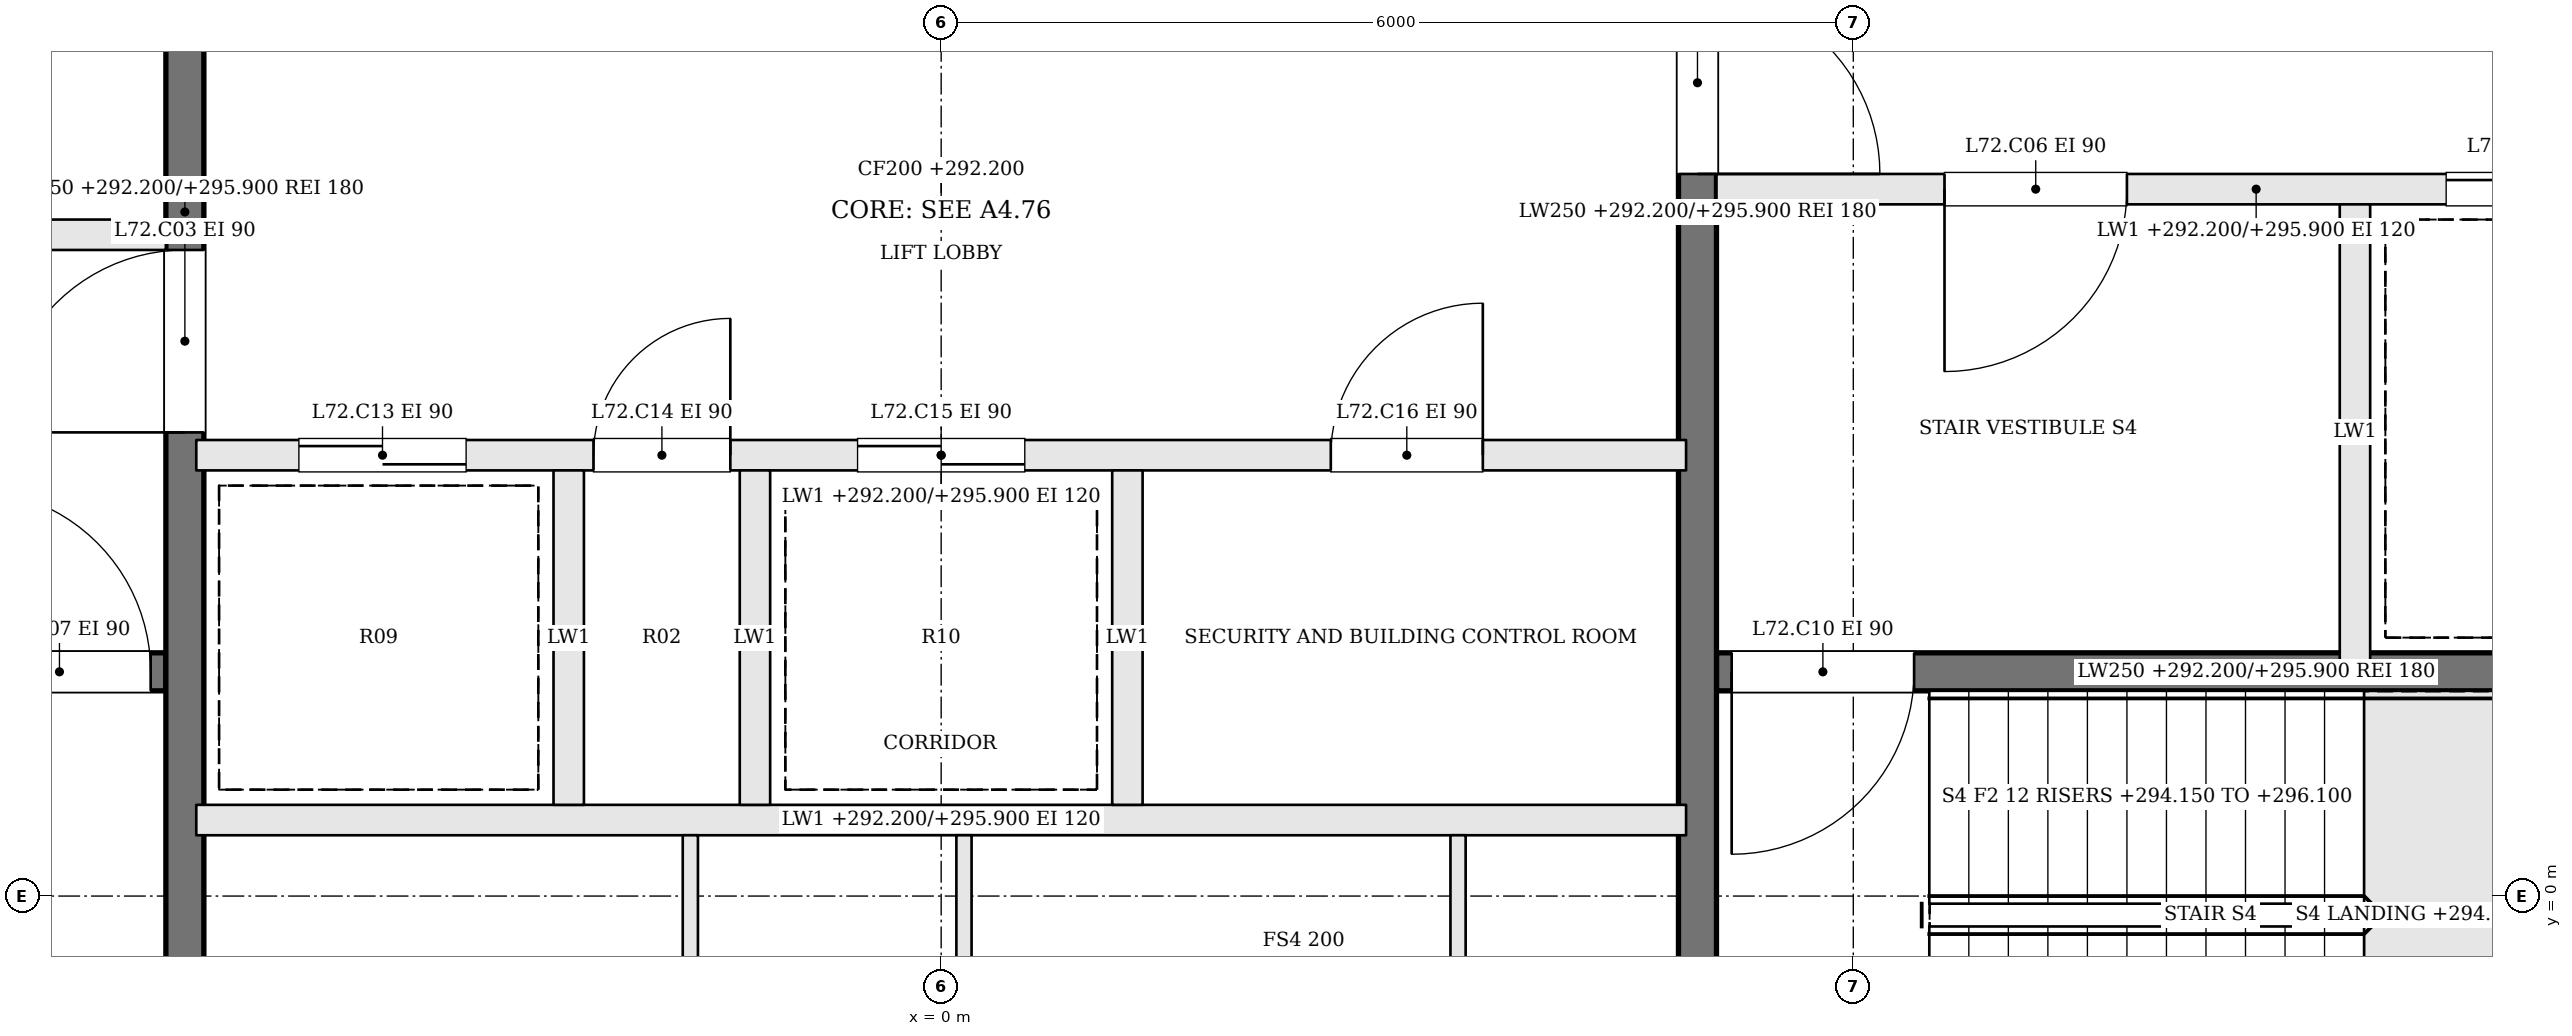
"""IFC4 building model, lengths in metres.
Left out: names, types, materials, properties, quantities, classifications, styles, units other than length and angle.
Written with IfcOpenShell. Run it as: python <this file> out.ifc"""

import sys

from ifc_helpers import new_model, si_unit, direction, frame, frame_2d, origin, place, context, subcontext, project, spatial, rectangle, extrude, element, fill, save


model = new_model("IFC4")
c1 = context("Model", 3, precision=1e-05, world=origin(), true_north=direction((0.0, 1.0)))
c2 = subcontext(c1, "Body", "Model", "MODEL_VIEW")
j1 = project(units=[si_unit("LENGTHUNIT", "METRE"), si_unit("PLANEANGLEUNIT", "RADIAN")], contexts=[c1])
p1 = place(None, origin())
s1 = spatial("IfcSite", under=j1, at=p1, CompositionType="ELEMENT")
p2 = place(p1, origin())
s2 = spatial("IfcBuilding", under=s1, at=p2, CompositionType="ELEMENT")
p3 = place(p2, frame((0.0, 0.0, 292.2)))
s3 = spatial("IfcBuildingStorey", under=s2, at=p3, CompositionType="ELEMENT", Elevation=292.2)
p4 = place(p3, frame((-12.2, 1.475, 0.0), z_axis=(0.0, 0.0, 1.0), x_axis=(1.0, 0.0, 0.0)))
e1 = element("IfcWall", 1, at=p4, inside=s3, PredefinedType="SOLIDWALL", context=c2, shape_type="SweptSolid", body=[
    extrude(rectangle(XDim=7.1, YDim=0.25, at=frame_2d((3.55, 0.0))), origin(), (0.0, 0.0, 1.0), 3.7),
])
p5 = place(p4, frame((5.8, 0.0, 0.0)))
e2 = element("IfcOpeningElement", 2, at=p5, cuts=e1, PredefinedType="OPENING", context=c2, shape_type="SweptSolid", body=[
    extrude(rectangle(XDim=1.2, YDim=2.1, at=frame_2d((0.6, 1.05))), frame((0.0, 0.135, 0.0), z_axis=(0.0, -1.0, 0.0), x_axis=(1.0, 0.0, 0.0)), (0.0, 0.0, 1.0), 0.27),
])
p6 = place(p3, frame((-12.2, 4.35, 0.0), z_axis=(0.0, 0.0, 1.0), x_axis=(1.0, 0.0, 0.0)))
e3 = element("IfcWall", 3, at=p6, inside=s3, PredefinedType="SOLIDWALL", context=c2, shape_type="SweptSolid", body=[
    extrude(rectangle(XDim=7.1, YDim=0.2, at=frame_2d((3.55, 0.0))), origin(), (0.0, 0.0, 1.0), 3.7),
])
p7 = place(p6, frame((4.4, 0.0, 0.0)))
e4 = element("IfcOpeningElement", 4, at=p7, cuts=e3, PredefinedType="OPENING", context=c2, shape_type="SweptSolid", body=[
    extrude(rectangle(XDim=1.2, YDim=2.1, at=frame_2d((0.6, 1.05))), frame((0.0, 0.11, 0.0), z_axis=(0.0, -1.0, 0.0), x_axis=(1.0, 0.0, 0.0)), (0.0, 0.0, 1.0), 0.22),
])
p8 = place(p6, frame((1.1, 0.0, 0.0)))
e5 = element("IfcOpeningElement", 5, at=p8, cuts=e3, PredefinedType="OPENING", context=c2, shape_type="SweptSolid", body=[
    extrude(rectangle(XDim=1.2, YDim=2.1, at=frame_2d((0.6, 1.05))), frame((0.0, 0.11, 0.0), z_axis=(0.0, -1.0, 0.0), x_axis=(1.0, 0.0, 0.0)), (0.0, 0.0, 1.0), 0.22),
])
p9 = place(p3, frame((12.2, 4.65, 0.0), z_axis=(0.0, 0.0, 1.0), x_axis=(-1.0, 0.0, 0.0)))
e6 = element("IfcWall", 6, at=p9, inside=s3, PredefinedType="SOLIDWALL", context=c2, shape_type="SweptSolid", body=[
    extrude(rectangle(XDim=7.1, YDim=0.2, at=frame_2d((3.55, 0.0))), origin(), (0.0, 0.0, 1.0), 3.7),
])
p10 = place(p9, frame((4.4, 0.0, 0.0)))
e7 = element("IfcOpeningElement", 7, at=p10, cuts=e6, PredefinedType="OPENING", context=c2, shape_type="SweptSolid", body=[
    extrude(rectangle(XDim=1.2, YDim=2.1, at=frame_2d((0.6, 1.05))), frame((0.0, 0.11, 0.0), z_axis=(0.0, -1.0, 0.0), x_axis=(1.0, 0.0, 0.0)), (0.0, 0.0, 1.0), 0.22),
])
p11 = place(p9, frame((1.1, 0.0, 0.0)))
e8 = element("IfcOpeningElement", 8, at=p11, cuts=e6, PredefinedType="OPENING", context=c2, shape_type="SweptSolid", body=[
    extrude(rectangle(XDim=1.2, YDim=2.1, at=frame_2d((0.6, 1.05))), frame((0.0, 0.11, 0.0), z_axis=(0.0, -1.0, 0.0), x_axis=(1.0, 0.0, 0.0)), (0.0, 0.0, 1.0), 0.22),
])
p12 = place(p3, frame((12.2, 1.475, 0.0), z_axis=(0.0, 0.0, 1.0), x_axis=(-1.0, 0.0, 0.0)))
e9 = element("IfcWall", 9, at=p12, inside=s3, PredefinedType="SOLIDWALL", context=c2, shape_type="SweptSolid", body=[
    extrude(rectangle(XDim=7.1, YDim=0.25, at=frame_2d((3.55, 0.0))), origin(), (0.0, 0.0, 1.0), 3.7),
])
p13 = place(p12, frame((5.8, 0.0, 0.0)))
e10 = element("IfcOpeningElement", 10, at=p13, cuts=e9, PredefinedType="OPENING", context=c2, shape_type="SweptSolid", body=[
    extrude(rectangle(XDim=1.2, YDim=2.1, at=frame_2d((0.6, 1.05))), frame((0.0, 0.135, 0.0), z_axis=(0.0, -1.0, 0.0), x_axis=(1.0, 0.0, 0.0)), (0.0, 0.0, 1.0), 0.27),
])
p14 = place(p3, frame((9.3, 4.55, 0.0), z_axis=(0.0, 0.0, 1.0), x_axis=(0.0, -1.0, 0.0)))
e11 = element("IfcWall", 11, at=p14, inside=s3, PredefinedType="SOLIDWALL", context=c2, shape_type="SweptSolid", body=[
    extrude(rectangle(XDim=3.0, YDim=0.2, at=frame_2d((1.5, 0.0))), origin(), (0.0, 0.0, 1.0), 3.7),
])
p15 = place(p3, frame((-4.975, -2.2, 0.0), z_axis=(0.0, 0.0, 1.0), x_axis=(0.0, 1.0, 0.0)))
e12 = element("IfcWall", 12, at=p15, inside=s3, PredefinedType="SOLIDWALL", context=c2, shape_type="SweptSolid", body=[
    extrude(rectangle(XDim=13.4, YDim=0.25, at=frame_2d((6.7, 0.0))), origin(), (0.0, 0.0, 1.0), 3.7),
])
p16 = place(p15, frame((5.25, 0.0, 0.0)))
e13 = element("IfcOpeningElement", 13, at=p16, cuts=e12, PredefinedType="OPENING", context=c2, shape_type="SweptSolid", body=[
    extrude(rectangle(XDim=1.2, YDim=2.1, at=frame_2d((0.6, 1.05))), frame((0.0, 0.135, 0.0), z_axis=(0.0, -1.0, 0.0), x_axis=(1.0, 0.0, 0.0)), (0.0, 0.0, 1.0), 0.27),
])
p17 = place(p3, frame((4.975, 11.2, 0.0), z_axis=(0.0, 0.0, 1.0), x_axis=(0.0, -1.0, 0.0)))
e14 = element("IfcWall", 14, at=p17, inside=s3, PredefinedType="SOLIDWALL", context=c2, shape_type="SweptSolid", body=[
    extrude(rectangle(XDim=13.4, YDim=0.25, at=frame_2d((6.7, 0.0))), origin(), (0.0, 0.0, 1.0), 3.7),
])
p18 = place(p17, frame((5.25, 0.0, 0.0)))
e15 = element("IfcOpeningElement", 15, at=p18, cuts=e14, PredefinedType="OPENING", context=c2, shape_type="SweptSolid", body=[
    extrude(rectangle(XDim=1.2, YDim=2.1, at=frame_2d((0.6, 1.05))), frame((0.0, 0.135, 0.0), z_axis=(0.0, -1.0, 0.0), x_axis=(1.0, 0.0, 0.0)), (0.0, 0.0, 1.0), 0.27),
])
p19 = place(p3, frame((-4.9, 0.5, 0.0), z_axis=(0.0, 0.0, 1.0), x_axis=(1.0, 0.0, 0.0)))
e16 = element("IfcWall", 16, at=p19, inside=s3, PredefinedType="SOLIDWALL", context=c2, shape_type="SweptSolid", body=[
    extrude(rectangle(XDim=9.8, YDim=0.2, at=frame_2d((4.9, 0.0))), origin(), (0.0, 0.0, 1.0), 3.7),
])
p20 = place(p3, frame((-4.9, 2.9, 0.0), z_axis=(0.0, 0.0, 1.0), x_axis=(1.0, 0.0, 0.0)))
e17 = element("IfcWall", 17, at=p20, inside=s3, PredefinedType="SOLIDWALL", context=c2, shape_type="SweptSolid", body=[
    extrude(rectangle(XDim=9.8, YDim=0.2, at=frame_2d((4.9, 0.0))), origin(), (0.0, 0.0, 1.0), 3.7),
])
p21 = place(p20, frame((0.675, 0.0, 0.0)))
e18 = element("IfcOpeningElement", 18, at=p21, cuts=e17, PredefinedType="OPENING", context=c2, shape_type="SweptSolid", body=[
    extrude(rectangle(XDim=1.1, YDim=2.1, at=frame_2d((0.55, 1.05))), frame((0.0, 0.11, 0.0), z_axis=(0.0, -1.0, 0.0), x_axis=(1.0, 0.0, 0.0)), (0.0, 0.0, 1.0), 0.22),
])
p22 = place(p20, frame((2.613, 0.0, 0.0)))
e19 = element("IfcOpeningElement", 19, at=p22, cuts=e17, PredefinedType="OPENING", context=c2, shape_type="SweptSolid", body=[
    extrude(rectangle(XDim=0.9, YDim=2.1, at=frame_2d((0.45, 1.05))), frame((0.0, 0.11, 0.0), z_axis=(0.0, -1.0, 0.0), x_axis=(1.0, 0.0, 0.0)), (0.0, 0.0, 1.0), 0.22),
])
p23 = place(p20, frame((4.35, 0.0, 0.0)))
e20 = element("IfcOpeningElement", 20, at=p23, cuts=e17, PredefinedType="OPENING", context=c2, shape_type="SweptSolid", body=[
    extrude(rectangle(XDim=1.1, YDim=2.1, at=frame_2d((0.55, 1.05))), frame((0.0, 0.11, 0.0), z_axis=(0.0, -1.0, 0.0), x_axis=(1.0, 0.0, 0.0)), (0.0, 0.0, 1.0), 0.22),
])
p24 = place(p20, frame((7.463, 0.0, 0.0)))
e21 = element("IfcOpeningElement", 21, at=p24, cuts=e17, PredefinedType="OPENING", context=c2, shape_type="SweptSolid", body=[
    extrude(rectangle(XDim=1.0, YDim=2.1, at=frame_2d((0.5, 1.05))), frame((0.0, 0.11, 0.0), z_axis=(0.0, -1.0, 0.0), x_axis=(1.0, 0.0, 0.0)), (0.0, 0.0, 1.0), 0.22),
])
for number, where, z_axis, x_axis in (
    (22, (-2.45, 0.6, 0.0), (0.0, 0.0, 1.0), (0.0, 1.0, 0.0)),
    (23, (-1.225, 0.6, 0.0), (0.0, 0.0, 1.0), (0.0, 1.0, 0.0)),
    (24, (1.225, 0.6, 0.0), (0.0, 0.0, 1.0), (0.0, 1.0, 0.0)),
):
    element("IfcWall", number, at=place(p3, frame(where, z_axis=z_axis, x_axis=x_axis)), inside=s3, PredefinedType="SOLIDWALL", context=c2, shape_type="SweptSolid", body=[
        extrude(rectangle(XDim=2.2, YDim=0.2, at=frame_2d((1.1, 0.0))), origin(), (0.0, 0.0, 1.0), 3.7),
    ])
for number, where, z_axis, x_axis in (
    (25, (-1.65, -2.2, 0.0), (0.0, 0.0, 1.0), (0.0, 1.0, 0.0)),
    (26, (0.15, -2.2, 0.0), (0.0, 0.0, 1.0), (0.0, 1.0, 0.0)),
    (27, (3.4, -2.2, 0.0), (0.0, 0.0, 1.0), (0.0, 1.0, 0.0)),
):
    element("IfcWall", number, at=place(p3, frame(where, z_axis=z_axis, x_axis=x_axis)), inside=s3, PredefinedType="PARTITIONING", context=c2, shape_type="SweptSolid", body=[
        extrude(rectangle(XDim=2.6, YDim=0.1, at=frame_2d((1.3, 0.0))), origin(), (0.0, 0.0, 1.0), 3.7),
    ])
p25 = place(p16, origin())
e28 = element("IfcDoor", 28, at=p25, inside=s3, OperationType="SINGLE_SWING_LEFT", PredefinedType="DOOR", context=c2, shape_type="SweptSolid", body=[
    extrude(rectangle(XDim=1.2, YDim=2.1, at=frame_2d((0.6, 1.05))), frame((0.0, 0.025, 0.0), z_axis=(0.0, -1.0, 0.0), x_axis=(1.0, 0.0, 0.0)), (0.0, 0.0, 1.0), 0.05),
])
fill(e13, e28)
p26 = place(p18, origin())
e29 = element("IfcDoor", 29, at=p26, inside=s3, OperationType="SINGLE_SWING_RIGHT", PredefinedType="DOOR", context=c2, shape_type="SweptSolid", body=[
    extrude(rectangle(XDim=1.2, YDim=2.1, at=frame_2d((0.6, 1.05))), frame((0.0, 0.025, 0.0), z_axis=(0.0, -1.0, 0.0), x_axis=(1.0, 0.0, 0.0)), (0.0, 0.0, 1.0), 0.05),
])
fill(e15, e29)
p27 = place(p10, origin())
e30 = element("IfcDoor", 30, at=p27, inside=s3, OperationType="SINGLE_SWING_RIGHT", PredefinedType="DOOR", context=c2, shape_type="SweptSolid", body=[
    extrude(rectangle(XDim=1.2, YDim=2.1, at=frame_2d((0.6, 1.05))), frame((0.0, 0.025, 0.0), z_axis=(0.0, -1.0, 0.0), x_axis=(1.0, 0.0, 0.0)), (0.0, 0.0, 1.0), 0.05),
])
fill(e7, e30)
p28 = place(p5, origin())
e31 = element("IfcDoor", 31, at=p28, inside=s3, OperationType="SINGLE_SWING_LEFT", PredefinedType="DOOR", context=c2, shape_type="SweptSolid", body=[
    extrude(rectangle(XDim=1.2, YDim=2.1, at=frame_2d((0.6, 1.05))), frame((0.0, 0.025, 0.0), z_axis=(0.0, -1.0, 0.0), x_axis=(1.0, 0.0, 0.0)), (0.0, 0.0, 1.0), 0.05),
])
fill(e2, e31)
p29 = place(p13, origin())
e32 = element("IfcDoor", 32, at=p29, inside=s3, OperationType="SINGLE_SWING_RIGHT", PredefinedType="DOOR", context=c2, shape_type="SweptSolid", body=[
    extrude(rectangle(XDim=1.2, YDim=2.1, at=frame_2d((0.6, 1.05))), frame((0.0, 0.025, 0.0), z_axis=(0.0, -1.0, 0.0), x_axis=(1.0, 0.0, 0.0)), (0.0, 0.0, 1.0), 0.05),
])
fill(e10, e32)
p30 = place(p11, origin())
e33 = element("IfcDoor", 33, at=p30, inside=s3, OperationType="SLIDING_TO_RIGHT", PredefinedType="DOOR", context=c2, shape_type="SweptSolid", body=[
    extrude(rectangle(XDim=1.2, YDim=2.1, at=frame_2d((0.6, 1.05))), frame((0.0, 0.025, 0.0), z_axis=(0.0, -1.0, 0.0), x_axis=(1.0, 0.0, 0.0)), (0.0, 0.0, 1.0), 0.05),
])
fill(e8, e33)
p31 = place(p21, origin())
e34 = element("IfcDoor", 34, at=p31, inside=s3, OperationType="SLIDING_TO_RIGHT", PredefinedType="DOOR", context=c2, shape_type="SweptSolid", body=[
    extrude(rectangle(XDim=1.1, YDim=2.1, at=frame_2d((0.55, 1.05))), frame((0.0, 0.025, 0.0), z_axis=(0.0, -1.0, 0.0), x_axis=(1.0, 0.0, 0.0)), (0.0, 0.0, 1.0), 0.05),
])
fill(e18, e34)
p32 = place(p22, origin())
e35 = element("IfcDoor", 35, at=p32, inside=s3, OperationType="SINGLE_SWING_RIGHT", PredefinedType="DOOR", context=c2, shape_type="SweptSolid", body=[
    extrude(rectangle(XDim=0.9, YDim=2.1, at=frame_2d((0.45, 1.05))), frame((0.0, 0.025, 0.0), z_axis=(0.0, -1.0, 0.0), x_axis=(1.0, 0.0, 0.0)), (0.0, 0.0, 1.0), 0.05),
])
fill(e19, e35)
p33 = place(p23, origin())
e36 = element("IfcDoor", 36, at=p33, inside=s3, OperationType="SLIDING_TO_LEFT", PredefinedType="DOOR", context=c2, shape_type="SweptSolid", body=[
    extrude(rectangle(XDim=1.1, YDim=2.1, at=frame_2d((0.55, 1.05))), frame((0.0, 0.025, 0.0), z_axis=(0.0, -1.0, 0.0), x_axis=(1.0, 0.0, 0.0)), (0.0, 0.0, 1.0), 0.05),
])
fill(e20, e36)
p34 = place(p24, origin())
e37 = element("IfcDoor", 37, at=p34, inside=s3, OperationType="SINGLE_SWING_RIGHT", PredefinedType="DOOR", context=c2, shape_type="SweptSolid", body=[
    extrude(rectangle(XDim=1.0, YDim=2.1, at=frame_2d((0.5, 1.05))), frame((0.0, 0.025, 0.0), z_axis=(0.0, -1.0, 0.0), x_axis=(1.0, 0.0, 0.0)), (0.0, 0.0, 1.0), 0.05),
])
fill(e21, e37)
save(model, sys.argv[1])
